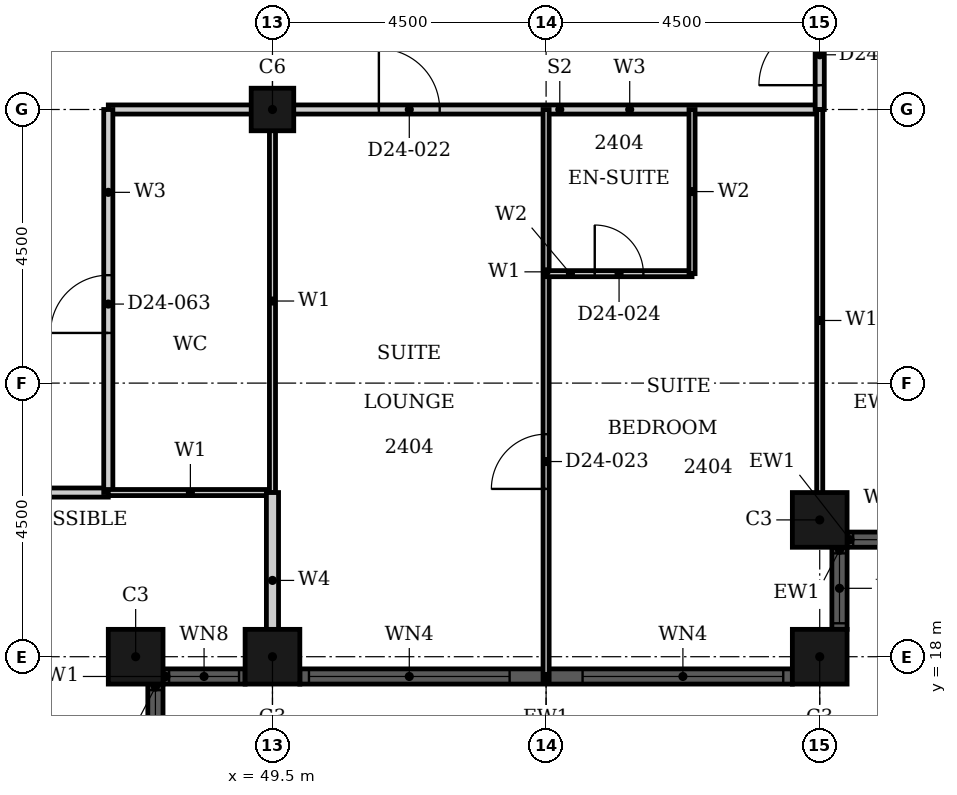
"""IFC4 building model, lengths in metres.
Left out: names, types, materials, properties, quantities, classifications, styles, units other than length and angle.
Written with IfcOpenShell. Run it as: python <this file> out.ifc"""

import sys

from ifc_helpers import new_model, si_unit, direction, frame, frame_2d, origin, origin_2d, place, context, subcontext, project, spatial, rectangle, hollow_rectangle, extrude, element, fill, save


model = new_model("IFC4")
c1 = context("Model", 3, precision=1e-05, world=origin(), true_north=direction((0.0, 1.0)))
c2 = subcontext(c1, "Body", "Model", "MODEL_VIEW")
j1 = project(units=[si_unit("LENGTHUNIT", "METRE"), si_unit("PLANEANGLEUNIT", "RADIAN")], contexts=[c1])
p1 = place(None, origin())
s1 = spatial("IfcSite", under=j1, at=p1, CompositionType="ELEMENT")
p2 = place(p1, origin())
s2 = spatial("IfcBuilding", under=s1, at=p2, CompositionType="ELEMENT")
p3 = place(p2, frame((0.0, 0.0, 100.8)))
s3 = spatial("IfcBuildingStorey", under=s2, at=p3, CompositionType="ELEMENT", Elevation=100.8)
for number, where, z_axis, x_axis in (
    (1, (47.25, 18.0, 0.0), (0.0, 0.0, 1.0), (1.0, 0.0, 0.0)),
    (2, (49.5, 18.0, 0.0), (0.0, 0.0, 1.0), (1.0, 0.0, 0.0)),
    (3, (58.5, 18.0, 0.0), (0.0, 0.0, 1.0), (1.0, 0.0, 0.0)),
    (4, (58.5, 20.25, 0.0), (0.0, 0.0, 1.0), (1.0, 0.0, 0.0)),
):
    element("IfcColumn", number, at=place(p3, frame(where, z_axis=z_axis, x_axis=x_axis)), inside=s3, PredefinedType="COLUMN", context=c2, shape_type="SweptSolid", body=[
        extrude(hollow_rectangle(XDim=0.9, YDim=0.9, WallThickness=0.028, at=origin_2d()), origin(), (0.0, 0.0, 1.0), 3.6),
    ])
p4 = place(p3, frame((49.5, 27.0, 0.0), z_axis=(0.0, 0.0, 1.0), x_axis=(1.0, 0.0, 0.0)))
e5 = element("IfcColumn", 5, at=p4, inside=s3, PredefinedType="COLUMN", context=c2, shape_type="SweptSolid", body=[
    extrude(hollow_rectangle(XDim=0.7, YDim=0.7, WallThickness=0.022, at=origin_2d()), origin(), (0.0, 0.0, 1.0), 3.6),
])
p5 = place(p3, frame((47.575, 16.2, 0.0), z_axis=(0.0, 0.0, 1.0), x_axis=(0.0, 1.0, 0.0)))
e6 = element("IfcWall", 6, at=p5, inside=s3, PredefinedType="SOLIDWALL", context=c2, shape_type="SweptSolid", body=[
    extrude(rectangle(XDim=1.35, YDim=0.25, at=frame_2d((0.675, 0.0))), origin(), (0.0, 0.0, 1.0), 3.6),
])
p6 = place(p5, frame((0.1, 0.0, 0.9)))
e7 = element("IfcOpeningElement", 7, at=p6, cuts=e6, PredefinedType="OPENING", context=c2, shape_type="SweptSolid", body=[
    extrude(rectangle(XDim=1.15, YDim=2.08, at=frame_2d((0.575, 1.04))), frame((0.0, 0.135, 0.0), z_axis=(0.0, -1.0, 0.0), x_axis=(1.0, 0.0, 0.0)), (0.0, 0.0, 1.0), 0.27),
])
p7 = place(p3, frame((47.7, 17.675, 0.0), z_axis=(0.0, 0.0, 1.0), x_axis=(1.0, 0.0, 0.0)))
e8 = element("IfcWall", 8, at=p7, inside=s3, PredefinedType="SOLIDWALL", context=c2, shape_type="SweptSolid", body=[
    extrude(rectangle(XDim=1.35, YDim=0.25, at=frame_2d((0.675, 0.0))), origin(), (0.0, 0.0, 1.0), 3.6),
])
p8 = place(p7, frame((0.1, 0.0, 0.9)))
e9 = element("IfcOpeningElement", 9, at=p8, cuts=e8, PredefinedType="OPENING", context=c2, shape_type="SweptSolid", body=[
    extrude(rectangle(XDim=1.15, YDim=2.08, at=frame_2d((0.575, 1.04))), frame((0.0, 0.135, 0.0), z_axis=(0.0, -1.0, 0.0), x_axis=(1.0, 0.0, 0.0)), (0.0, 0.0, 1.0), 0.27),
])
p9 = place(p3, frame((49.95, 17.675, 0.0), z_axis=(0.0, 0.0, 1.0), x_axis=(1.0, 0.0, 0.0)))
e10 = element("IfcWall", 10, at=p9, inside=s3, PredefinedType="SOLIDWALL", context=c2, shape_type="SweptSolid", body=[
    extrude(rectangle(XDim=8.1, YDim=0.25, at=frame_2d((4.05, 0.0))), origin(), (0.0, 0.0, 1.0), 3.6),
])
p10 = place(p9, frame((0.15, 0.0, 0.9)))
e11 = element("IfcOpeningElement", 11, at=p10, cuts=e10, PredefinedType="OPENING", context=c2, shape_type="SweptSolid", body=[
    extrude(rectangle(XDim=3.3, YDim=2.08, at=frame_2d((1.65, 1.04))), frame((0.0, 0.135, 0.0), z_axis=(0.0, -1.0, 0.0), x_axis=(1.0, 0.0, 0.0)), (0.0, 0.0, 1.0), 0.27),
])
p11 = place(p9, frame((4.65, 0.0, 0.9)))
e12 = element("IfcOpeningElement", 12, at=p11, cuts=e10, PredefinedType="OPENING", context=c2, shape_type="SweptSolid", body=[
    extrude(rectangle(XDim=3.3, YDim=2.08, at=frame_2d((1.65, 1.04))), frame((0.0, 0.135, 0.0), z_axis=(0.0, -1.0, 0.0), x_axis=(1.0, 0.0, 0.0)), (0.0, 0.0, 1.0), 0.27),
])
p12 = place(p3, frame((58.825, 18.45, 0.0), z_axis=(0.0, 0.0, 1.0), x_axis=(0.0, 1.0, 0.0)))
e13 = element("IfcWall", 13, at=p12, inside=s3, PredefinedType="SOLIDWALL", context=c2, shape_type="SweptSolid", body=[
    extrude(rectangle(XDim=1.35, YDim=0.25, at=frame_2d((0.675, 0.0))), origin(), (0.0, 0.0, 1.0), 3.6),
])
p13 = place(p12, frame((0.1, 0.0, 0.9)))
e14 = element("IfcOpeningElement", 14, at=p13, cuts=e13, PredefinedType="OPENING", context=c2, shape_type="SweptSolid", body=[
    extrude(rectangle(XDim=1.15, YDim=2.08, at=frame_2d((0.575, 1.04))), frame((0.0, 0.135, 0.0), z_axis=(0.0, -1.0, 0.0), x_axis=(1.0, 0.0, 0.0)), (0.0, 0.0, 1.0), 0.27),
])
p14 = place(p3, frame((58.95, 19.925, 0.0), z_axis=(0.0, 0.0, 1.0), x_axis=(1.0, 0.0, 0.0)))
e15 = element("IfcWall", 15, at=p14, inside=s3, PredefinedType="SOLIDWALL", context=c2, shape_type="SweptSolid", body=[
    extrude(rectangle(XDim=1.35, YDim=0.25, at=frame_2d((0.675, 0.0))), origin(), (0.0, 0.0, 1.0), 3.6),
])
p15 = place(p14, frame((0.1, 0.0, 0.9)))
e16 = element("IfcOpeningElement", 16, at=p15, cuts=e15, PredefinedType="OPENING", context=c2, shape_type="SweptSolid", body=[
    extrude(rectangle(XDim=1.15, YDim=2.08, at=frame_2d((0.575, 1.04))), frame((0.0, 0.135, 0.0), z_axis=(0.0, -1.0, 0.0), x_axis=(1.0, 0.0, 0.0)), (0.0, 0.0, 1.0), 0.27),
])
p16 = place(p3, frame((40.5, 20.7, 0.0), z_axis=(0.0, 0.0, 1.0), x_axis=(1.0, 0.0, 0.0)))
e17 = element("IfcWall", 17, at=p16, inside=s3, PredefinedType="PARTITIONING", context=c2, shape_type="SweptSolid", body=[
    extrude(rectangle(XDim=6.3, YDim=0.15, at=frame_2d((3.15, 0.0))), origin(), (0.0, 0.0, 1.0), 3.3),
])
p17 = place(p16, frame((2.95, 0.0, 0.0)))
e18 = element("IfcOpeningElement", 18, at=p17, cuts=e17, PredefinedType="OPENING", context=c2, shape_type="SweptSolid", body=[
    extrude(rectangle(XDim=1.0, YDim=2.1, at=frame_2d((0.5, 1.05))), frame((0.0, 0.085, 0.0), z_axis=(0.0, -1.0, 0.0), x_axis=(1.0, 0.0, 0.0)), (0.0, 0.0, 1.0), 0.17),
])
p18 = place(p3, frame((46.8, 27.0, 0.0), z_axis=(0.0, 0.0, 1.0), x_axis=(1.0, 0.0, 0.0)))
e19 = element("IfcWall", 19, at=p18, inside=s3, PredefinedType="PARTITIONING", context=c2, shape_type="SweptSolid", body=[
    extrude(rectangle(XDim=11.7, YDim=0.15, at=frame_2d((5.85, 0.0))), origin(), (0.0, 0.0, 1.0), 2.58),
])
p19 = place(p18, frame((4.45, 0.0, 0.0)))
e20 = element("IfcOpeningElement", 20, at=p19, cuts=e19, PredefinedType="OPENING", context=c2, shape_type="SweptSolid", body=[
    extrude(rectangle(XDim=1.0, YDim=2.1, at=frame_2d((0.5, 1.05))), frame((0.0, 0.085, 0.0), z_axis=(0.0, -1.0, 0.0), x_axis=(1.0, 0.0, 0.0)), (0.0, 0.0, 1.0), 0.17),
])
p20 = place(p3, frame((46.8, 20.7, 0.0), z_axis=(0.0, 0.0, 1.0), x_axis=(0.0, 1.0, 0.0)))
e21 = element("IfcWall", 21, at=p20, inside=s3, PredefinedType="PARTITIONING", context=c2, shape_type="SweptSolid", body=[
    extrude(rectangle(XDim=6.3, YDim=0.15, at=frame_2d((3.15, 0.0))), origin(), (0.0, 0.0, 1.0), 3.3),
])
p21 = place(p20, frame((2.625, 0.0, 0.0)))
e22 = element("IfcOpeningElement", 22, at=p21, cuts=e21, PredefinedType="OPENING", context=c2, shape_type="SweptSolid", body=[
    extrude(rectangle(XDim=0.95, YDim=2.1, at=frame_2d((0.475, 1.05))), frame((0.0, 0.085, 0.0), z_axis=(0.0, -1.0, 0.0), x_axis=(1.0, 0.0, 0.0)), (0.0, 0.0, 1.0), 0.17),
])
p22 = place(p3, frame((58.5, 27.0, 0.0), z_axis=(0.0, 0.0, 1.0), x_axis=(0.0, 1.0, 0.0)))
e23 = element("IfcWall", 23, at=p22, inside=s3, PredefinedType="PARTITIONING", context=c2, shape_type="SweptSolid", body=[
    extrude(rectangle(XDim=1.8, YDim=0.15, at=frame_2d((0.9, 0.0))), origin(), (0.0, 0.0, 1.0), 3.3),
])
p23 = place(p22, frame((0.4, 0.0, 0.0)))
e24 = element("IfcOpeningElement", 24, at=p23, cuts=e23, PredefinedType="OPENING", context=c2, shape_type="SweptSolid", body=[
    extrude(rectangle(XDim=1.0, YDim=2.1, at=frame_2d((0.5, 1.05))), frame((0.0, 0.085, 0.0), z_axis=(0.0, -1.0, 0.0), x_axis=(1.0, 0.0, 0.0)), (0.0, 0.0, 1.0), 0.17),
])
p24 = place(p3, frame((46.8, 20.7, 0.0), z_axis=(0.0, 0.0, 1.0), x_axis=(1.0, 0.0, 0.0)))
e25 = element("IfcWall", 25, at=p24, inside=s3, PredefinedType="PARTITIONING", context=c2, shape_type="SweptSolid", body=[
    extrude(rectangle(XDim=2.7, YDim=0.1, at=frame_2d((1.35, 0.0))), origin(), (0.0, 0.0, 1.0), 3.3),
])
p25 = place(p3, frame((49.5, 20.7, 0.0), z_axis=(0.0, 0.0, 1.0), x_axis=(0.0, 1.0, 0.0)))
e26 = element("IfcWall", 26, at=p25, inside=s3, PredefinedType="PARTITIONING", context=c2, shape_type="SweptSolid", body=[
    extrude(rectangle(XDim=6.3, YDim=0.1, at=frame_2d((3.15, 0.0))), origin(), (0.0, 0.0, 1.0), 2.38),
])
p26 = place(p3, frame((54.0, 17.61, 0.0), z_axis=(0.0, 0.0, 1.0), x_axis=(0.0, 1.0, 0.0)))
e27 = element("IfcWall", 27, at=p26, inside=s3, PredefinedType="PARTITIONING", context=c2, shape_type="SweptSolid", body=[
    extrude(rectangle(XDim=9.39, YDim=0.1, at=frame_2d((4.695, 0.0))), origin(), (0.0, 0.0, 1.0), 3.3),
])
p27 = place(p26, frame((3.15, 0.0, 0.0)))
e28 = element("IfcOpeningElement", 28, at=p27, cuts=e27, PredefinedType="OPENING", context=c2, shape_type="SweptSolid", body=[
    extrude(rectangle(XDim=0.9, YDim=2.1, at=frame_2d((0.45, 1.05))), frame((0.0, 0.06, 0.0), z_axis=(0.0, -1.0, 0.0), x_axis=(1.0, 0.0, 0.0)), (0.0, 0.0, 1.0), 0.12),
])
p28 = place(p3, frame((58.5, 20.06, 0.0), z_axis=(0.0, 0.0, 1.0), x_axis=(0.0, 1.0, 0.0)))
e29 = element("IfcWall", 29, at=p28, inside=s3, PredefinedType="PARTITIONING", context=c2, shape_type="SweptSolid", body=[
    extrude(rectangle(XDim=6.94, YDim=0.1, at=frame_2d((3.47, 0.0))), origin(), (0.0, 0.0, 1.0), 3.3),
])
p29 = place(p3, frame((49.5, 17.81, 0.0), z_axis=(0.0, 0.0, 1.0), x_axis=(0.0, 1.0, 0.0)))
e30 = element("IfcWall", 30, at=p29, inside=s3, PredefinedType="PARTITIONING", context=c2, shape_type="SweptSolid", body=[
    extrude(rectangle(XDim=2.89, YDim=0.2, at=frame_2d((1.445, 0.0))), origin(), (0.0, 0.0, 1.0), 2.38),
])
p30 = place(p3, frame((54.0, 24.3, 0.0), z_axis=(0.0, 0.0, 1.0), x_axis=(1.0, 0.0, 0.0)))
e31 = element("IfcWall", 31, at=p30, inside=s3, PredefinedType="PARTITIONING", context=c2, shape_type="SweptSolid", body=[
    extrude(rectangle(XDim=2.4, YDim=0.1, at=frame_2d((1.2, 0.0))), origin(), (0.0, 0.0, 1.0), 3.3),
])
p31 = place(p30, frame((0.8, 0.0, 0.0)))
e32 = element("IfcOpeningElement", 32, at=p31, cuts=e31, PredefinedType="OPENING", context=c2, shape_type="SweptSolid", body=[
    extrude(rectangle(XDim=0.8, YDim=2.1, at=frame_2d((0.4, 1.05))), frame((0.0, 0.06, 0.0), z_axis=(0.0, -1.0, 0.0), x_axis=(1.0, 0.0, 0.0)), (0.0, 0.0, 1.0), 0.12),
])
p32 = place(p3, frame((56.4, 24.3, 0.0), z_axis=(0.0, 0.0, 1.0), x_axis=(0.0, 1.0, 0.0)))
e33 = element("IfcWall", 33, at=p32, inside=s3, PredefinedType="PARTITIONING", context=c2, shape_type="SweptSolid", body=[
    extrude(rectangle(XDim=2.7, YDim=0.1, at=frame_2d((1.35, 0.0))), origin(), (0.0, 0.0, 1.0), 3.3),
])
p33 = place(p6, origin())
e34 = element("IfcWindow", 34, at=p33, inside=s3, PartitioningType="SINGLE_PANEL", PredefinedType="WINDOW", context=c2, shape_type="SweptSolid", body=[
    extrude(rectangle(XDim=1.15, YDim=2.08, at=frame_2d((0.575, 1.04))), frame((0.0, 0.03, 0.0), z_axis=(0.0, -1.0, 0.0), x_axis=(1.0, 0.0, 0.0)), (0.0, 0.0, 1.0), 0.06),
])
fill(e7, e34)
p34 = place(p8, origin())
e35 = element("IfcWindow", 35, at=p34, inside=s3, PartitioningType="SINGLE_PANEL", PredefinedType="WINDOW", context=c2, shape_type="SweptSolid", body=[
    extrude(rectangle(XDim=1.15, YDim=2.08, at=frame_2d((0.575, 1.04))), frame((0.0, 0.03, 0.0), z_axis=(0.0, -1.0, 0.0), x_axis=(1.0, 0.0, 0.0)), (0.0, 0.0, 1.0), 0.06),
])
fill(e9, e35)
p35 = place(p10, origin())
e36 = element("IfcWindow", 36, at=p35, inside=s3, PartitioningType="SINGLE_PANEL", PredefinedType="WINDOW", context=c2, shape_type="SweptSolid", body=[
    extrude(rectangle(XDim=3.3, YDim=2.08, at=frame_2d((1.65, 1.04))), frame((0.0, 0.03, 0.0), z_axis=(0.0, -1.0, 0.0), x_axis=(1.0, 0.0, 0.0)), (0.0, 0.0, 1.0), 0.06),
])
fill(e11, e36)
p36 = place(p11, origin())
e37 = element("IfcWindow", 37, at=p36, inside=s3, PartitioningType="SINGLE_PANEL", PredefinedType="WINDOW", context=c2, shape_type="SweptSolid", body=[
    extrude(rectangle(XDim=3.3, YDim=2.08, at=frame_2d((1.65, 1.04))), frame((0.0, 0.03, 0.0), z_axis=(0.0, -1.0, 0.0), x_axis=(1.0, 0.0, 0.0)), (0.0, 0.0, 1.0), 0.06),
])
fill(e12, e37)
p37 = place(p13, origin())
e38 = element("IfcWindow", 38, at=p37, inside=s3, PartitioningType="SINGLE_PANEL", PredefinedType="WINDOW", context=c2, shape_type="SweptSolid", body=[
    extrude(rectangle(XDim=1.15, YDim=2.08, at=frame_2d((0.575, 1.04))), frame((0.0, 0.03, 0.0), z_axis=(0.0, -1.0, 0.0), x_axis=(1.0, 0.0, 0.0)), (0.0, 0.0, 1.0), 0.06),
])
fill(e14, e38)
p38 = place(p15, origin())
e39 = element("IfcWindow", 39, at=p38, inside=s3, PartitioningType="SINGLE_PANEL", PredefinedType="WINDOW", context=c2, shape_type="SweptSolid", body=[
    extrude(rectangle(XDim=1.15, YDim=2.08, at=frame_2d((0.575, 1.04))), frame((0.0, 0.03, 0.0), z_axis=(0.0, -1.0, 0.0), x_axis=(1.0, 0.0, 0.0)), (0.0, 0.0, 1.0), 0.06),
])
fill(e16, e39)
p39 = place(p19, origin())
e40 = element("IfcDoor", 40, at=p39, inside=s3, OperationType="SINGLE_SWING_RIGHT", PredefinedType="DOOR", context=c2, shape_type="SweptSolid", body=[
    extrude(rectangle(XDim=1.0, YDim=2.1, at=frame_2d((0.5, 1.05))), frame((0.0, 0.025, 0.0), z_axis=(0.0, -1.0, 0.0), x_axis=(1.0, 0.0, 0.0)), (0.0, 0.0, 1.0), 0.05),
])
fill(e20, e40)
p40 = place(p27, origin())
e41 = element("IfcDoor", 41, at=p40, inside=s3, OperationType="SINGLE_SWING_LEFT", PredefinedType="DOOR", context=c2, shape_type="SweptSolid", body=[
    extrude(rectangle(XDim=0.9, YDim=2.1, at=frame_2d((0.45, 1.05))), frame((0.0, 0.025, 0.0), z_axis=(0.0, -1.0, 0.0), x_axis=(1.0, 0.0, 0.0)), (0.0, 0.0, 1.0), 0.05),
])
fill(e28, e41)
p41 = place(p31, origin())
e42 = element("IfcDoor", 42, at=p41, inside=s3, OperationType="SINGLE_SWING_RIGHT", PredefinedType="DOOR", context=c2, shape_type="SweptSolid", body=[
    extrude(rectangle(XDim=0.8, YDim=2.1, at=frame_2d((0.4, 1.05))), frame((0.0, 0.025, 0.0), z_axis=(0.0, -1.0, 0.0), x_axis=(1.0, 0.0, 0.0)), (0.0, 0.0, 1.0), 0.05),
])
fill(e32, e42)
p42 = place(p23, origin())
e43 = element("IfcDoor", 43, at=p42, inside=s3, OperationType="SINGLE_SWING_LEFT", PredefinedType="DOOR", context=c2, shape_type="SweptSolid", body=[
    extrude(rectangle(XDim=1.0, YDim=2.1, at=frame_2d((0.5, 1.05))), frame((0.0, 0.025, 0.0), z_axis=(0.0, -1.0, 0.0), x_axis=(1.0, 0.0, 0.0)), (0.0, 0.0, 1.0), 0.05),
])
fill(e24, e43)
p43 = place(p21, origin())
e44 = element("IfcDoor", 44, at=p43, inside=s3, OperationType="SINGLE_SWING_LEFT", PredefinedType="DOOR", context=c2, shape_type="SweptSolid", body=[
    extrude(rectangle(XDim=0.95, YDim=2.1, at=frame_2d((0.475, 1.05))), frame((0.0, 0.025, 0.0), z_axis=(0.0, -1.0, 0.0), x_axis=(1.0, 0.0, 0.0)), (0.0, 0.0, 1.0), 0.05),
])
fill(e22, e44)
save(model, sys.argv[1])
